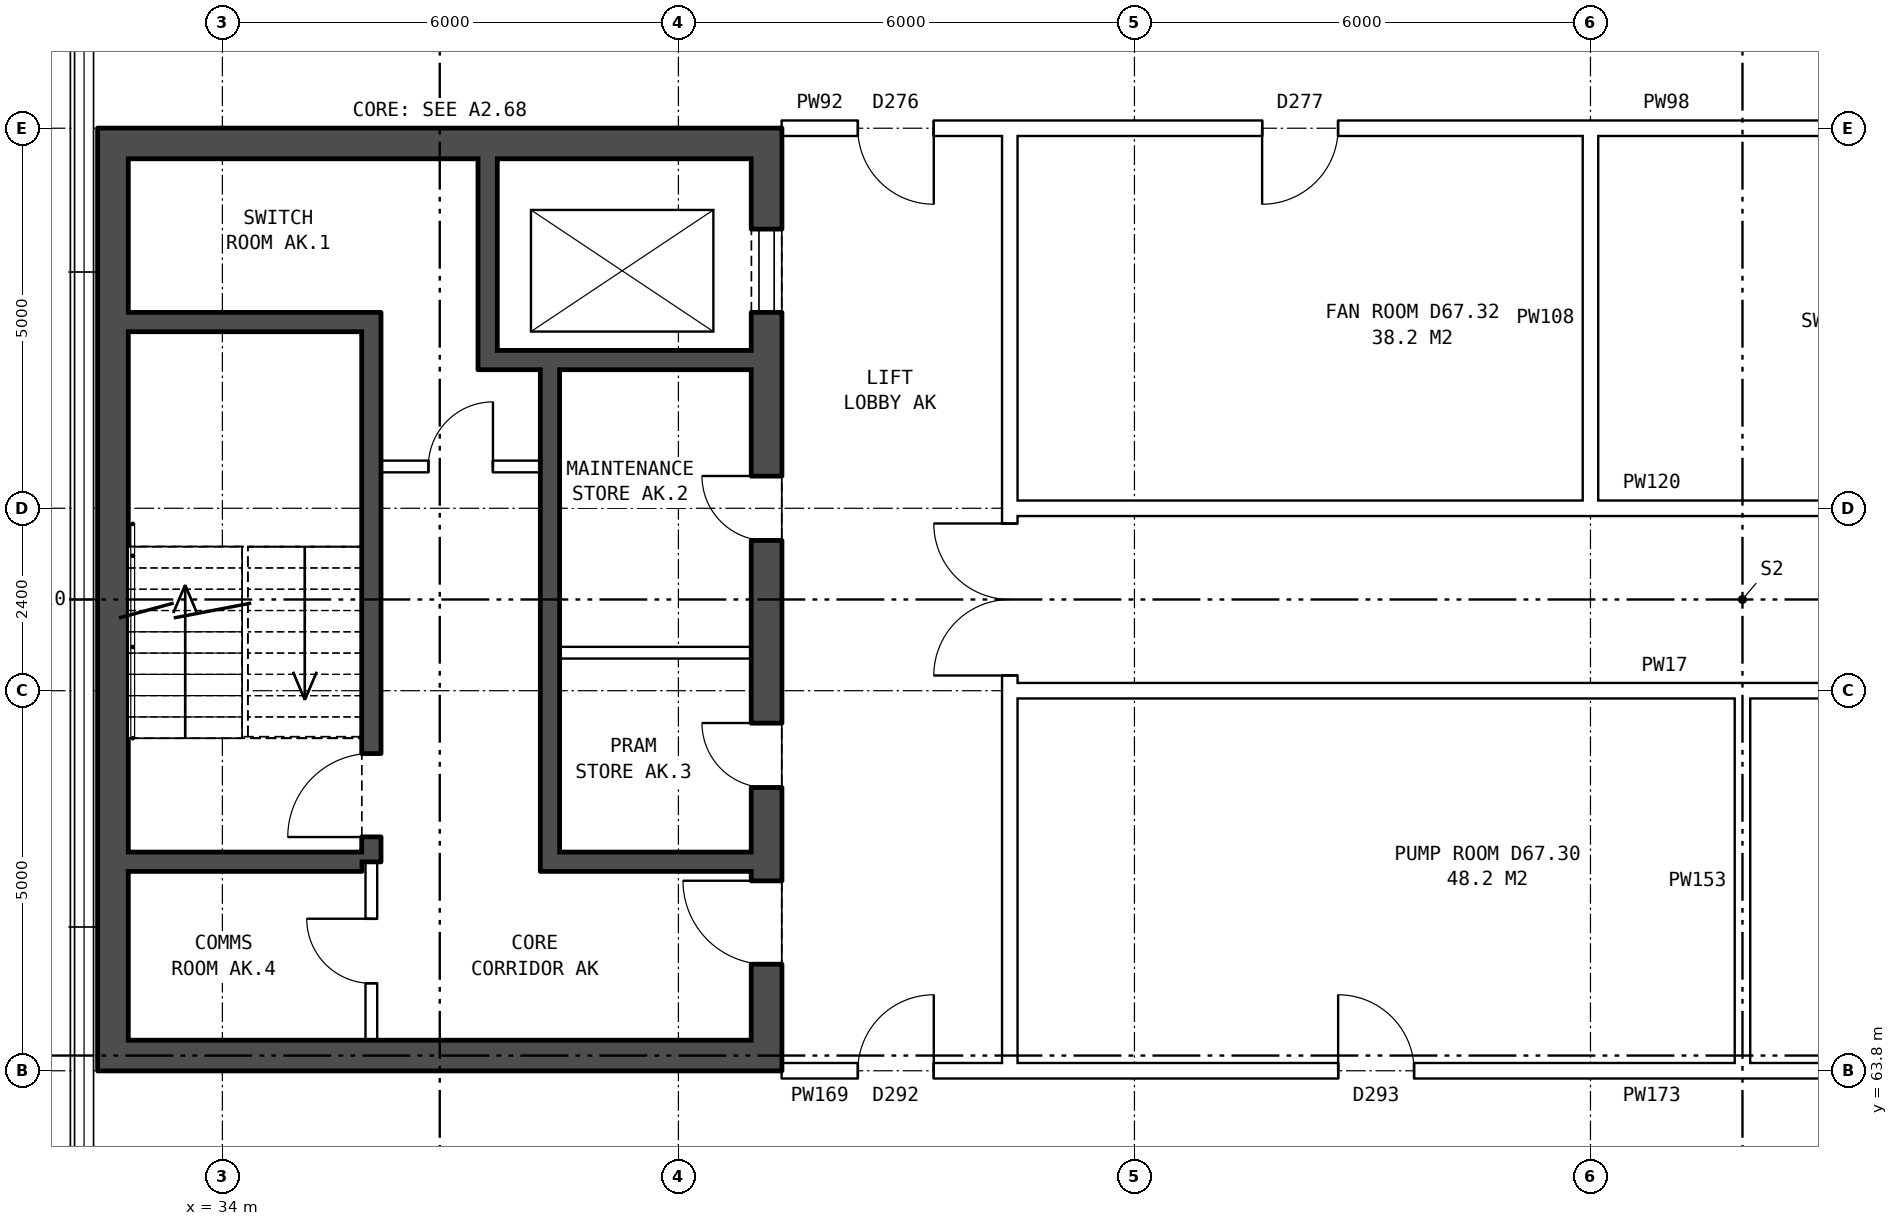
"""IFC4 building model, lengths in metres.
Left out: names, types, materials, properties, quantities, classifications, styles, units other than length and angle.
Written with IfcOpenShell. Run it as: python <this file> out.ifc"""

import sys

from ifc_helpers import new_model, si_unit, direction, frame, frame_2d, origin, place, context, subcontext, project, spatial, rectangle, extrude, element, fill, save


model = new_model("IFC4")
c1 = context("Model", 3, precision=1e-05, world=origin(), true_north=direction((0.0, 1.0)))
c2 = subcontext(c1, "Body", "Model", "MODEL_VIEW")
j1 = project(units=[si_unit("LENGTHUNIT", "METRE"), si_unit("PLANEANGLEUNIT", "RADIAN")], contexts=[c1])
p1 = place(None, origin())
s1 = spatial("IfcSite", under=j1, at=p1, CompositionType="ELEMENT")
p2 = place(p1, origin())
s2 = spatial("IfcBuilding", under=s1, at=p2, CompositionType="ELEMENT")
p3 = place(p2, frame((0.0, 0.0, 236.9)))
s3 = spatial("IfcBuildingStorey", under=s2, at=p3, CompositionType="ELEMENT", Elevation=236.9)
p4 = place(p3, frame((41.16, 76.2, 0.0), z_axis=(0.0, 0.0, 1.0), x_axis=(0.0, -1.0, 0.0)))
e1 = element("IfcWall", 1, at=p4, inside=s3, PredefinedType="SHEAR", context=c2, shape_type="SweptSolid", body=[
    extrude(rectangle(XDim=12.4, YDim=0.4, at=frame_2d((6.2, 0.0))), origin(), (0.0, 0.0, 1.0), 6.7),
])
p5 = place(p4, frame((1.325, 0.0, 0.0)))
e2 = element("IfcOpeningElement", 2, at=p5, cuts=e1, PredefinedType="OPENING", context=c2, shape_type="SweptSolid", body=[
    extrude(rectangle(XDim=1.1, YDim=2.1, at=frame_2d((0.55, 1.05))), frame((0.0, 0.21, 0.0), z_axis=(0.0, -1.0, 0.0), x_axis=(1.0, 0.0, 0.0)), (0.0, 0.0, 1.0), 0.42),
])
p6 = place(p4, frame((4.575, 0.0, 0.0)))
e3 = element("IfcOpeningElement", 3, at=p6, cuts=e1, PredefinedType="OPENING", context=c2, shape_type="SweptSolid", body=[
    extrude(rectangle(XDim=0.85, YDim=2.1, at=frame_2d((0.425, 1.05))), frame((0.0, 0.21, 0.0), z_axis=(0.0, -1.0, 0.0), x_axis=(1.0, 0.0, 0.0)), (0.0, 0.0, 1.0), 0.42),
])
p7 = place(p4, frame((7.825, 0.0, 0.0)))
e4 = element("IfcOpeningElement", 4, at=p7, cuts=e1, PredefinedType="OPENING", context=c2, shape_type="SweptSolid", body=[
    extrude(rectangle(XDim=0.85, YDim=2.1, at=frame_2d((0.425, 1.05))), frame((0.0, 0.21, 0.0), z_axis=(0.0, -1.0, 0.0), x_axis=(1.0, 0.0, 0.0)), (0.0, 0.0, 1.0), 0.42),
])
p8 = place(p4, frame((9.9, 0.0, 0.0)))
e5 = element("IfcOpeningElement", 5, at=p8, cuts=e1, PredefinedType="OPENING", context=c2, shape_type="SweptSolid", body=[
    extrude(rectangle(XDim=1.1, YDim=2.1, at=frame_2d((0.55, 1.05))), frame((0.0, 0.21, 0.0), z_axis=(0.0, -1.0, 0.0), x_axis=(1.0, 0.0, 0.0)), (0.0, 0.0, 1.0), 0.42),
])
p9 = place(p3, frame((32.56, 76.2, 0.0), z_axis=(0.0, 0.0, 1.0), x_axis=(0.0, -1.0, 0.0)))
e6 = element("IfcWall", 6, at=p9, inside=s3, PredefinedType="SHEAR", context=c2, shape_type="SweptSolid", body=[
    extrude(rectangle(XDim=12.4, YDim=0.4, at=frame_2d((6.2, 0.0))), origin(), (0.0, 0.0, 1.0), 6.7),
])
for number, where, z_axis, x_axis in (
    (7, (40.96, 76.0, 0.0), (0.0, 0.0, 1.0), (-1.0, 0.0, 0.0)),
    (8, (40.96, 64.0, 0.0), (0.0, 0.0, 1.0), (-1.0, 0.0, 0.0)),
):
    element("IfcWall", number, at=place(p3, frame(where, z_axis=z_axis, x_axis=x_axis)), inside=s3, PredefinedType="SHEAR", context=c2, shape_type="SweptSolid", body=[
        extrude(rectangle(XDim=8.2, YDim=0.4, at=frame_2d((4.1, 0.0))), origin(), (0.0, 0.0, 1.0), 6.7),
    ])
p10 = place(p3, frame((35.835, 73.65, 0.0), z_axis=(0.0, 0.0, 1.0), x_axis=(-1.0, 0.0, 0.0)))
e9 = element("IfcWall", 9, at=p10, inside=s3, PredefinedType="SHEAR", context=c2, shape_type="SweptSolid", body=[
    extrude(rectangle(XDim=3.075, YDim=0.25, at=frame_2d((1.538, 0.0))), origin(), (0.0, 0.0, 1.0), 6.7),
])
p11 = place(p3, frame((40.96, 73.15, 0.0), z_axis=(0.0, 0.0, 1.0), x_axis=(-1.0, 0.0, 0.0)))
e10 = element("IfcWall", 10, at=p11, inside=s3, PredefinedType="SHEAR", context=c2, shape_type="SweptSolid", body=[
    extrude(rectangle(XDim=3.595, YDim=0.25, at=frame_2d((1.797, 0.0))), origin(), (0.0, 0.0, 1.0), 6.7),
])
p12 = place(p3, frame((38.185, 71.75, 0.0), z_axis=(0.0, 0.0, 1.0), x_axis=(-1.0, 0.0, 0.0)))
e11 = element("IfcWall", 11, at=p12, inside=s3, PredefinedType="PARTITIONING", context=c2, shape_type="SweptSolid", body=[
    extrude(rectangle(XDim=2.1, YDim=0.15, at=frame_2d((1.05, 0.0))), origin(), (0.0, 0.0, 1.0), 6.7),
])
p13 = place(p12, frame((0.625, 0.0, 0.0)))
e12 = element("IfcOpeningElement", 12, at=p13, cuts=e11, PredefinedType="OPENING", context=c2, shape_type="SweptSolid", body=[
    extrude(rectangle(XDim=0.85, YDim=2.1, at=frame_2d((0.425, 1.05))), frame((0.0, 0.085, 0.0), z_axis=(0.0, -1.0, 0.0), x_axis=(1.0, 0.0, 0.0)), (0.0, 0.0, 1.0), 0.17),
])
p14 = place(p3, frame((40.96, 69.3, 0.0), z_axis=(0.0, 0.0, 1.0), x_axis=(-1.0, 0.0, 0.0)))
e13 = element("IfcWall", 13, at=p14, inside=s3, PredefinedType="PARTITIONING", context=c2, shape_type="SweptSolid", body=[
    extrude(rectangle(XDim=2.525, YDim=0.15, at=frame_2d((1.262, 0.0))), origin(), (0.0, 0.0, 1.0), 6.7),
])
p15 = place(p3, frame((40.96, 66.55, 0.0), z_axis=(0.0, 0.0, 1.0), x_axis=(-1.0, 0.0, 0.0)))
e14 = element("IfcWall", 14, at=p15, inside=s3, PredefinedType="SHEAR", context=c2, shape_type="SweptSolid", body=[
    extrude(rectangle(XDim=2.525, YDim=0.25, at=frame_2d((1.262, 0.0))), origin(), (0.0, 0.0, 1.0), 6.7),
])
p16 = place(p3, frame((35.835, 66.55, 0.0), z_axis=(0.0, 0.0, 1.0), x_axis=(-1.0, 0.0, 0.0)))
e15 = element("IfcWall", 15, at=p16, inside=s3, PredefinedType="SHEAR", context=c2, shape_type="SweptSolid", body=[
    extrude(rectangle(XDim=3.075, YDim=0.25, at=frame_2d((1.538, 0.0))), origin(), (0.0, 0.0, 1.0), 6.7),
])
p17 = place(p3, frame((38.31, 73.025, 0.0), z_axis=(0.0, 0.0, 1.0), x_axis=(0.0, -1.0, 0.0)))
e16 = element("IfcWall", 16, at=p17, inside=s3, PredefinedType="SHEAR", context=c2, shape_type="SweptSolid", body=[
    extrude(rectangle(XDim=6.6, YDim=0.25, at=frame_2d((3.3, 0.0))), origin(), (0.0, 0.0, 1.0), 6.7),
])
p18 = place(p3, frame((37.49, 75.8, 0.0), z_axis=(0.0, 0.0, 1.0), x_axis=(0.0, -1.0, 0.0)))
e17 = element("IfcWall", 17, at=p18, inside=s3, PredefinedType="SHEAR", context=c2, shape_type="SweptSolid", body=[
    extrude(rectangle(XDim=2.525, YDim=0.25, at=frame_2d((1.263, 0.0))), origin(), (0.0, 0.0, 1.0), 6.7),
])
p19 = place(p3, frame((35.96, 73.775, 0.0), z_axis=(0.0, 0.0, 1.0), x_axis=(0.0, -1.0, 0.0)))
e18 = element("IfcWall", 18, at=p19, inside=s3, PredefinedType="SHEAR", context=c2, shape_type="SweptSolid", body=[
    extrude(rectangle(XDim=7.225, YDim=0.25, at=frame_2d((3.612, 0.0))), origin(), (0.0, 0.0, 1.0), 6.7),
])
p20 = place(p19, frame((5.8, 0.0, 0.0)))
e19 = element("IfcOpeningElement", 19, at=p20, cuts=e18, PredefinedType="OPENING", context=c2, shape_type="SweptSolid", body=[
    extrude(rectangle(XDim=1.1, YDim=2.1, at=frame_2d((0.55, 1.05))), frame((0.0, 0.135, 0.0), z_axis=(0.0, -1.0, 0.0), x_axis=(1.0, 0.0, 0.0)), (0.0, 0.0, 1.0), 0.27),
])
p21 = place(p3, frame((35.96, 66.55, 0.0), z_axis=(0.0, 0.0, 1.0), x_axis=(0.0, -1.0, 0.0)))
e20 = element("IfcWall", 20, at=p21, inside=s3, PredefinedType="PARTITIONING", context=c2, shape_type="SweptSolid", body=[
    extrude(rectangle(XDim=2.35, YDim=0.15, at=frame_2d((1.175, 0.0))), origin(), (0.0, 0.0, 1.0), 6.7),
])
p22 = place(p21, frame((0.75, 0.0, 0.0)))
e21 = element("IfcOpeningElement", 21, at=p22, cuts=e20, PredefinedType="OPENING", context=c2, shape_type="SweptSolid", body=[
    extrude(rectangle(XDim=0.85, YDim=2.1, at=frame_2d((0.425, 1.05))), frame((0.0, 0.085, 0.0), z_axis=(0.0, -1.0, 0.0), x_axis=(1.0, 0.0, 0.0)), (0.0, 0.0, 1.0), 0.17),
])
p23 = place(p3, frame((44.36, 63.9, 0.0), z_axis=(0.0, 0.0, 1.0), x_axis=(0.0, 1.0, 0.0)))
e22 = element("IfcWall", 22, at=p23, inside=s3, PredefinedType="PARTITIONING", context=c2, shape_type="SweptSolid", body=[
    extrude(rectangle(XDim=12.2, YDim=0.2, at=frame_2d((6.1, 0.0))), origin(), (0.0, 0.0, 1.0), 6.7),
])
p24 = place(p23, frame((5.1, 0.0, 0.0)))
e23 = element("IfcOpeningElement", 23, at=p24, cuts=e22, PredefinedType="OPENING", context=c2, shape_type="SweptSolid", body=[
    extrude(rectangle(XDim=2.0, YDim=2.1, at=frame_2d((1.0, 1.05))), frame((0.0, 0.11, 0.0), z_axis=(0.0, -1.0, 0.0), x_axis=(1.0, 0.0, 0.0)), (0.0, 0.0, 1.0), 0.22),
])
p25 = place(p3, frame((44.36, 63.8, 0.0), z_axis=(0.0, 0.0, 1.0), x_axis=(1.0, 0.0, 0.0)))
e24 = element("IfcWall", 24, at=p25, inside=s3, PredefinedType="PARTITIONING", context=c2, shape_type="SweptSolid", body=[
    extrude(rectangle(XDim=19.28, YDim=0.2, at=frame_2d((9.64, 0.0))), origin(), (0.0, 0.0, 1.0), 6.7),
])
p26 = place(p25, frame((4.32, 0.0, 0.0)))
e25 = element("IfcOpeningElement", 25, at=p26, cuts=e24, PredefinedType="OPENING", context=c2, shape_type="SweptSolid", body=[
    extrude(rectangle(XDim=1.0, YDim=2.1, at=frame_2d((0.5, 1.05))), frame((0.0, 0.11, 0.0), z_axis=(0.0, -1.0, 0.0), x_axis=(1.0, 0.0, 0.0)), (0.0, 0.0, 1.0), 0.22),
])
p27 = place(p25, frame((13.96, 0.0, 0.0)))
e26 = element("IfcOpeningElement", 26, at=p27, cuts=e24, PredefinedType="OPENING", context=c2, shape_type="SweptSolid", body=[
    extrude(rectangle(XDim=1.0, YDim=2.1, at=frame_2d((0.5, 1.05))), frame((0.0, 0.11, 0.0), z_axis=(0.0, -1.0, 0.0), x_axis=(1.0, 0.0, 0.0)), (0.0, 0.0, 1.0), 0.22),
])
p28 = place(p3, frame((41.36, 63.8, 0.0), z_axis=(0.0, 0.0, 1.0), x_axis=(1.0, 0.0, 0.0)))
e27 = element("IfcWall", 27, at=p28, inside=s3, PredefinedType="PARTITIONING", context=c2, shape_type="SweptSolid", body=[
    extrude(rectangle(XDim=3.0, YDim=0.2, at=frame_2d((1.5, 0.0))), origin(), (0.0, 0.0, 1.0), 6.7),
])
p29 = place(p28, frame((1.0, 0.0, 0.0)))
e28 = element("IfcOpeningElement", 28, at=p29, cuts=e27, PredefinedType="OPENING", context=c2, shape_type="SweptSolid", body=[
    extrude(rectangle(XDim=1.0, YDim=2.1, at=frame_2d((0.5, 1.05))), frame((0.0, 0.11, 0.0), z_axis=(0.0, -1.0, 0.0), x_axis=(1.0, 0.0, 0.0)), (0.0, 0.0, 1.0), 0.22),
])
for number, where, z_axis, x_axis in (
    (29, (44.36, 68.8, 0.0), (0.0, 0.0, 1.0), (1.0, 0.0, 0.0)),
    (30, (44.36, 71.2, 0.0), (0.0, 0.0, 1.0), (1.0, 0.0, 0.0)),
):
    element("IfcWall", number, at=place(p3, frame(where, z_axis=z_axis, x_axis=x_axis)), inside=s3, PredefinedType="PARTITIONING", context=c2, shape_type="SweptSolid", body=[
        extrude(rectangle(XDim=19.28, YDim=0.2, at=frame_2d((9.64, 0.0))), origin(), (0.0, 0.0, 1.0), 6.7),
    ])
p30 = place(p3, frame((44.36, 76.2, 0.0), z_axis=(0.0, 0.0, 1.0), x_axis=(1.0, 0.0, 0.0)))
e31 = element("IfcWall", 31, at=p30, inside=s3, PredefinedType="PARTITIONING", context=c2, shape_type="SweptSolid", body=[
    extrude(rectangle(XDim=19.28, YDim=0.2, at=frame_2d((9.64, 0.0))), origin(), (0.0, 0.0, 1.0), 6.7),
])
p31 = place(p30, frame((3.32, 0.0, 0.0)))
e32 = element("IfcOpeningElement", 32, at=p31, cuts=e31, PredefinedType="OPENING", context=c2, shape_type="SweptSolid", body=[
    extrude(rectangle(XDim=1.0, YDim=2.1, at=frame_2d((0.5, 1.05))), frame((0.0, 0.11, 0.0), z_axis=(0.0, -1.0, 0.0), x_axis=(1.0, 0.0, 0.0)), (0.0, 0.0, 1.0), 0.22),
])
p32 = place(p30, frame((12.96, 0.0, 0.0)))
e33 = element("IfcOpeningElement", 33, at=p32, cuts=e31, PredefinedType="OPENING", context=c2, shape_type="SweptSolid", body=[
    extrude(rectangle(XDim=1.0, YDim=2.1, at=frame_2d((0.5, 1.05))), frame((0.0, 0.11, 0.0), z_axis=(0.0, -1.0, 0.0), x_axis=(1.0, 0.0, 0.0)), (0.0, 0.0, 1.0), 0.22),
])
p33 = place(p3, frame((41.36, 76.2, 0.0), z_axis=(0.0, 0.0, 1.0), x_axis=(1.0, 0.0, 0.0)))
e34 = element("IfcWall", 34, at=p33, inside=s3, PredefinedType="PARTITIONING", context=c2, shape_type="SweptSolid", body=[
    extrude(rectangle(XDim=3.0, YDim=0.2, at=frame_2d((1.5, 0.0))), origin(), (0.0, 0.0, 1.0), 6.7),
])
p34 = place(p33, frame((1.0, 0.0, 0.0)))
e35 = element("IfcOpeningElement", 35, at=p34, cuts=e34, PredefinedType="OPENING", context=c2, shape_type="SweptSolid", body=[
    extrude(rectangle(XDim=1.0, YDim=2.1, at=frame_2d((0.5, 1.05))), frame((0.0, 0.11, 0.0), z_axis=(0.0, -1.0, 0.0), x_axis=(1.0, 0.0, 0.0)), (0.0, 0.0, 1.0), 0.22),
])
for number, where, z_axis, x_axis in (
    (36, (52.0, 71.1, 0.0), (0.0, 0.0, 1.0), (0.0, 1.0, 0.0)),
    (37, (54.0, 63.7, 0.0), (0.0, 0.0, 1.0), (0.0, 1.0, 0.0)),
):
    element("IfcWall", number, at=place(p3, frame(where, z_axis=z_axis, x_axis=x_axis)), inside=s3, PredefinedType="PARTITIONING", context=c2, shape_type="SweptSolid", body=[
        extrude(rectangle(XDim=5.2, YDim=0.2, at=frame_2d((2.6, 0.0))), origin(), (0.0, 0.0, 1.0), 6.7),
    ])
p35 = place(p5, origin())
e38 = element("IfcDoor", 38, at=p35, inside=s3, OperationType="DOUBLE_DOOR_SLIDING", PredefinedType="DOOR", context=c2, shape_type="SweptSolid", body=[
    extrude(rectangle(XDim=1.1, YDim=2.1, at=frame_2d((0.55, 1.05))), frame((0.0, -0.135, 0.0), z_axis=(0.0, -1.0, 0.0), x_axis=(1.0, 0.0, 0.0)), (0.0, 0.0, 1.0), 0.05),
])
fill(e2, e38)
p36 = place(p6, frame((0.85, 0.0, 0.0), z_axis=(0.0, 0.0, 1.0), x_axis=(-1.0, 0.0, 0.0)))
e39 = element("IfcDoor", 39, at=p36, inside=s3, OperationType="SINGLE_SWING_RIGHT", PredefinedType="DOOR", context=c2, shape_type="SweptSolid", body=[
    extrude(rectangle(XDim=0.85, YDim=2.1, at=frame_2d((0.425, 1.05))), frame((0.0, 0.185, 0.0), z_axis=(0.0, -1.0, 0.0), x_axis=(1.0, 0.0, 0.0)), (0.0, 0.0, 1.0), 0.05),
])
fill(e3, e39)
p37 = place(p7, frame((0.85, 0.0, 0.0), z_axis=(0.0, 0.0, 1.0), x_axis=(-1.0, 0.0, 0.0)))
e40 = element("IfcDoor", 40, at=p37, inside=s3, OperationType="SINGLE_SWING_RIGHT", PredefinedType="DOOR", context=c2, shape_type="SweptSolid", body=[
    extrude(rectangle(XDim=0.85, YDim=2.1, at=frame_2d((0.425, 1.05))), frame((0.0, 0.185, 0.0), z_axis=(0.0, -1.0, 0.0), x_axis=(1.0, 0.0, 0.0)), (0.0, 0.0, 1.0), 0.05),
])
fill(e4, e40)
p38 = place(p8, frame((1.1, 0.0, 0.0), z_axis=(0.0, 0.0, 1.0), x_axis=(-1.0, 0.0, 0.0)))
e41 = element("IfcDoor", 41, at=p38, inside=s3, OperationType="SINGLE_SWING_RIGHT", PredefinedType="DOOR", context=c2, shape_type="SweptSolid", body=[
    extrude(rectangle(XDim=1.1, YDim=2.1, at=frame_2d((0.55, 1.05))), frame((0.0, 0.185, 0.0), z_axis=(0.0, -1.0, 0.0), x_axis=(1.0, 0.0, 0.0)), (0.0, 0.0, 1.0), 0.05),
])
fill(e5, e41)
p39 = place(p20, frame((1.1, 0.0, 0.0), z_axis=(0.0, 0.0, 1.0), x_axis=(-1.0, 0.0, 0.0)))
e42 = element("IfcDoor", 42, at=p39, inside=s3, OperationType="SINGLE_SWING_LEFT", PredefinedType="DOOR", context=c2, shape_type="SweptSolid", body=[
    extrude(rectangle(XDim=1.1, YDim=2.1, at=frame_2d((0.55, 1.05))), frame((0.0, 0.025, 0.0), z_axis=(0.0, -1.0, 0.0), x_axis=(1.0, 0.0, 0.0)), (0.0, 0.0, 1.0), 0.05),
])
fill(e19, e42)
p40 = place(p13, frame((0.85, 0.0, 0.0), z_axis=(0.0, 0.0, 1.0), x_axis=(-1.0, 0.0, 0.0)))
e43 = element("IfcDoor", 43, at=p40, inside=s3, OperationType="SINGLE_SWING_RIGHT", PredefinedType="DOOR", context=c2, shape_type="SweptSolid", body=[
    extrude(rectangle(XDim=0.85, YDim=2.1, at=frame_2d((0.425, 1.05))), frame((0.0, 0.025, 0.0), z_axis=(0.0, -1.0, 0.0), x_axis=(1.0, 0.0, 0.0)), (0.0, 0.0, 1.0), 0.05),
])
fill(e12, e43)
p41 = place(p22, frame((0.85, 0.0, 0.0), z_axis=(0.0, 0.0, 1.0), x_axis=(-1.0, 0.0, 0.0)))
e44 = element("IfcDoor", 44, at=p41, inside=s3, OperationType="SINGLE_SWING_RIGHT", PredefinedType="DOOR", context=c2, shape_type="SweptSolid", body=[
    extrude(rectangle(XDim=0.85, YDim=2.1, at=frame_2d((0.425, 1.05))), frame((0.0, 0.025, 0.0), z_axis=(0.0, -1.0, 0.0), x_axis=(1.0, 0.0, 0.0)), (0.0, 0.0, 1.0), 0.05),
])
fill(e21, e44)
p42 = place(p24, origin())
e45 = element("IfcDoor", 45, at=p42, inside=s3, OperationType="DOUBLE_DOOR_SINGLE_SWING", PredefinedType="DOOR", context=c2, shape_type="SweptSolid", body=[
    extrude(rectangle(XDim=2.0, YDim=2.1, at=frame_2d((1.0, 1.05))), frame((0.0, 0.025, 0.0), z_axis=(0.0, -1.0, 0.0), x_axis=(1.0, 0.0, 0.0)), (0.0, 0.0, 1.0), 0.05),
])
fill(e23, e45)
p43 = place(p26, origin())
e46 = element("IfcDoor", 46, at=p43, inside=s3, OperationType="SINGLE_SWING_LEFT", PredefinedType="DOOR", context=c2, shape_type="SweptSolid", body=[
    extrude(rectangle(XDim=1.0, YDim=2.1, at=frame_2d((0.5, 1.05))), frame((0.0, 0.025, 0.0), z_axis=(0.0, -1.0, 0.0), x_axis=(1.0, 0.0, 0.0)), (0.0, 0.0, 1.0), 0.05),
])
fill(e25, e46)
p44 = place(p29, origin())
e47 = element("IfcDoor", 47, at=p44, inside=s3, OperationType="SINGLE_SWING_RIGHT", PredefinedType="DOOR", context=c2, shape_type="SweptSolid", body=[
    extrude(rectangle(XDim=1.0, YDim=2.1, at=frame_2d((0.5, 1.05))), frame((0.0, 0.025, 0.0), z_axis=(0.0, -1.0, 0.0), x_axis=(1.0, 0.0, 0.0)), (0.0, 0.0, 1.0), 0.05),
])
fill(e28, e47)
p45 = place(p31, frame((1.0, 0.0, 0.0), z_axis=(0.0, 0.0, 1.0), x_axis=(-1.0, 0.0, 0.0)))
e48 = element("IfcDoor", 48, at=p45, inside=s3, OperationType="SINGLE_SWING_RIGHT", PredefinedType="DOOR", context=c2, shape_type="SweptSolid", body=[
    extrude(rectangle(XDim=1.0, YDim=2.1, at=frame_2d((0.5, 1.05))), frame((0.0, 0.025, 0.0), z_axis=(0.0, -1.0, 0.0), x_axis=(1.0, 0.0, 0.0)), (0.0, 0.0, 1.0), 0.05),
])
fill(e32, e48)
p46 = place(p34, frame((1.0, 0.0, 0.0), z_axis=(0.0, 0.0, 1.0), x_axis=(-1.0, 0.0, 0.0)))
e49 = element("IfcDoor", 49, at=p46, inside=s3, OperationType="SINGLE_SWING_LEFT", PredefinedType="DOOR", context=c2, shape_type="SweptSolid", body=[
    extrude(rectangle(XDim=1.0, YDim=2.1, at=frame_2d((0.5, 1.05))), frame((0.0, 0.025, 0.0), z_axis=(0.0, -1.0, 0.0), x_axis=(1.0, 0.0, 0.0)), (0.0, 0.0, 1.0), 0.05),
])
fill(e35, e49)
save(model, sys.argv[1])
